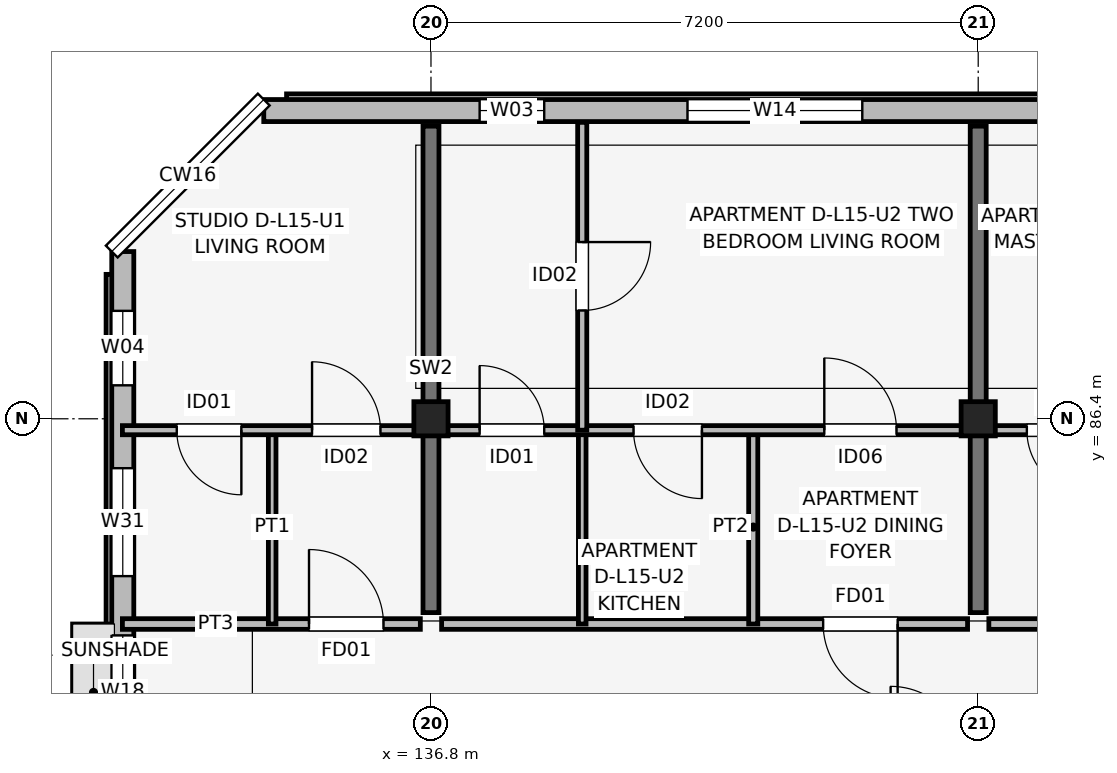
"""IFC4 building model, lengths in metres.
Left out: names, types, materials, properties, quantities, classifications, styles, units other than length and angle.
Written with IfcOpenShell. Run it as: python <this file> out.ifc"""

import sys

from ifc_helpers import new_model, si_unit, direction, frame, frame_2d, origin, origin_2d, place, context, subcontext, project, spatial, rectangle, extrude, element, fill, save


model = new_model("IFC4")
c1 = context("Model", 3, precision=1e-05, world=origin(), true_north=direction((0.0, 1.0)))
c2 = subcontext(c1, "Body", "Model", "MODEL_VIEW")
j1 = project(units=[si_unit("LENGTHUNIT", "METRE"), si_unit("PLANEANGLEUNIT", "RADIAN")], contexts=[c1])
p1 = place(None, origin())
s1 = spatial("IfcSite", under=j1, at=p1, CompositionType="ELEMENT")
p2 = place(p1, origin())
s2 = spatial("IfcBuilding", under=s1, at=p2, CompositionType="ELEMENT")
p3 = place(p2, frame((0.0, 0.0, 49.65)))
s3 = spatial("IfcBuildingStorey", under=s2, at=p3, CompositionType="ELEMENT", Elevation=49.65)
for number, where, z_axis, x_axis in (
    (1, (136.8, 86.4, 0.0), (0.0, 0.0, 1.0), (1.0, 0.0, 0.0)),
    (2, (144.0, 86.4, 0.0), (0.0, 0.0, 1.0), (1.0, 0.0, 0.0)),
):
    element("IfcColumn", number, at=place(p3, frame(where, z_axis=z_axis, x_axis=x_axis)), inside=s3, PredefinedType="COLUMN", context=c2, shape_type="SweptSolid", body=[
        extrude(rectangle(XDim=0.45, YDim=0.45, at=origin_2d()), origin(), (0.0, 0.0, 1.0), 3.15),
    ])
for number, where, z_axis, x_axis in (
    (3, (136.8, 83.85, 0.0), (0.0, 0.0, 1.0), (0.0, 1.0, 0.0)),
    (4, (144.0, 83.85, 0.0), (0.0, 0.0, 1.0), (0.0, 1.0, 0.0)),
):
    element("IfcWall", number, at=place(p3, frame(where, z_axis=z_axis, x_axis=x_axis)), inside=s3, PredefinedType="SHEAR", context=c2, shape_type="SweptSolid", body=[
        extrude(rectangle(XDim=6.4, YDim=0.21, at=frame_2d((3.2, 0.0))), origin(), (0.0, 0.0, 1.0), 3.15),
    ])
p4 = place(p3, frame((161.2, 90.455, 0.0), z_axis=(0.0, 0.0, 1.0), x_axis=(-1.0, 0.0, 0.0)))
e5 = element("IfcWall", 5, at=p4, inside=s3, PredefinedType="SOLIDWALL", context=c2, shape_type="SweptSolid", body=[
    extrude(rectangle(XDim=26.6, YDim=0.29, at=frame_2d((13.3, 0.0))), origin(), (0.0, 0.0, 1.0), 2.48),
])
p5 = place(p4, frame((22.91, 0.0, 0.75)))
e6 = element("IfcOpeningElement", 6, at=p5, cuts=e5, PredefinedType="OPENING", context=c2, shape_type="SweptSolid", body=[
    extrude(rectangle(XDim=0.85, YDim=1.4, at=frame_2d((0.425, 0.7))), frame((0.0, 0.155, 0.0), z_axis=(0.0, -1.0, 0.0), x_axis=(1.0, 0.0, 0.0)), (0.0, 0.0, 1.0), 0.31),
])
p6 = place(p4, frame((18.725, 0.0, 0.7)))
e7 = element("IfcOpeningElement", 7, at=p6, cuts=e5, PredefinedType="OPENING", context=c2, shape_type="SweptSolid", body=[
    extrude(rectangle(XDim=2.3, YDim=1.65, at=frame_2d((1.15, 0.825))), frame((0.0, 0.155, 0.0), z_axis=(0.0, -1.0, 0.0), x_axis=(1.0, 0.0, 0.0)), (0.0, 0.0, 1.0), 0.31),
])
p7 = place(p4, frame((13.935, 0.0, 0.7)))
e8 = element("IfcOpeningElement", 8, at=p7, cuts=e5, PredefinedType="OPENING", context=c2, shape_type="SweptSolid", body=[
    extrude(rectangle(XDim=2.45, YDim=1.65, at=frame_2d((1.225, 0.825))), frame((0.0, 0.155, 0.0), z_axis=(0.0, -1.0, 0.0), x_axis=(1.0, 0.0, 0.0)), (0.0, 0.0, 1.0), 0.31),
])
p8 = place(p4, frame((11.09, 0.0, 0.75)))
e9 = element("IfcOpeningElement", 9, at=p8, cuts=e5, PredefinedType="OPENING", context=c2, shape_type="SweptSolid", body=[
    extrude(rectangle(XDim=1.22, YDim=1.5, at=frame_2d((0.61, 0.75))), frame((0.0, 0.155, 0.0), z_axis=(0.0, -1.0, 0.0), x_axis=(1.0, 0.0, 0.0)), (0.0, 0.0, 1.0), 0.31),
])
p9 = place(p4, frame((8.265, 0.0, 0.75)))
e10 = element("IfcOpeningElement", 10, at=p9, cuts=e5, PredefinedType="OPENING", context=c2, shape_type="SweptSolid", body=[
    extrude(rectangle(XDim=1.34, YDim=1.55, at=frame_2d((0.67, 0.775))), frame((0.0, 0.155, 0.0), z_axis=(0.0, -1.0, 0.0), x_axis=(1.0, 0.0, 0.0)), (0.0, 0.0, 1.0), 0.31),
])
p10 = place(p4, frame((4.545, 0.0, 0.7)))
e11 = element("IfcOpeningElement", 11, at=p10, cuts=e5, PredefinedType="OPENING", context=c2, shape_type="SweptSolid", body=[
    extrude(rectangle(XDim=1.86, YDim=1.6, at=frame_2d((0.93, 0.8))), frame((0.0, 0.155, 0.0), z_axis=(0.0, -1.0, 0.0), x_axis=(1.0, 0.0, 0.0)), (0.0, 0.0, 1.0), 0.31),
])
p11 = place(p4, frame((0.41, 0.0, 0.7)))
e12 = element("IfcOpeningElement", 12, at=p11, cuts=e5, PredefinedType="OPENING", context=c2, shape_type="SweptSolid", body=[
    extrude(rectangle(XDim=2.0, YDim=1.65, at=frame_2d((1.0, 0.825))), frame((0.0, 0.155, 0.0), z_axis=(0.0, -1.0, 0.0), x_axis=(1.0, 0.0, 0.0)), (0.0, 0.0, 1.0), 0.31),
])
p12 = place(p3, frame((132.745, 88.6, 0.0), z_axis=(0.0, 0.0, 1.0), x_axis=(0.0, -1.0, 0.0)))
e13 = element("IfcWall", 13, at=p12, inside=s3, PredefinedType="SOLIDWALL", context=c2, shape_type="SweptSolid", body=[
    extrude(rectangle(XDim=14.6, YDim=0.29, at=frame_2d((7.3, 0.0))), origin(), (0.0, 0.0, 1.0), 2.91),
])
p13 = place(p12, frame((5.05, 0.0, 1.05)))
e14 = element("IfcOpeningElement", 14, at=p13, cuts=e13, PredefinedType="OPENING", context=c2, shape_type="SweptSolid", body=[
    extrude(rectangle(XDim=1.5, YDim=1.15, at=frame_2d((0.75, 0.575))), frame((0.0, 0.155, 0.0), z_axis=(0.0, -1.0, 0.0), x_axis=(1.0, 0.0, 0.0)), (0.0, 0.0, 1.0), 0.31),
])
p14 = place(p12, frame((2.85, 0.0, 0.75)))
e15 = element("IfcOpeningElement", 15, at=p14, cuts=e13, PredefinedType="OPENING", context=c2, shape_type="SweptSolid", body=[
    extrude(rectangle(XDim=1.42, YDim=1.6, at=frame_2d((0.71, 0.8))), frame((0.0, 0.155, 0.0), z_axis=(0.0, -1.0, 0.0), x_axis=(1.0, 0.0, 0.0)), (0.0, 0.0, 1.0), 0.31),
])
p15 = place(p12, frame((0.78, 0.0, 0.75)))
e16 = element("IfcOpeningElement", 16, at=p15, cuts=e13, PredefinedType="OPENING", context=c2, shape_type="SweptSolid", body=[
    extrude(rectangle(XDim=0.98, YDim=1.45, at=frame_2d((0.49, 0.725))), frame((0.0, 0.155, 0.0), z_axis=(0.0, -1.0, 0.0), x_axis=(1.0, 0.0, 0.0)), (0.0, 0.0, 1.0), 0.31),
])
p16 = place(p3, frame((132.74, 83.7, 0.0), z_axis=(0.0, 0.0, 1.0), x_axis=(1.0, 0.0, 0.0)))
e17 = element("IfcWall", 17, at=p16, inside=s3, PredefinedType="PARTITIONING", context=c2, shape_type="SweptSolid", body=[
    extrude(rectangle(XDim=3.92, YDim=0.14, at=frame_2d((1.96, 0.0))), origin(), (0.0, 0.0, 1.0), 2.38),
])
p17 = place(p16, frame((2.455, 0.0, 0.0)))
e18 = element("IfcOpeningElement", 18, at=p17, cuts=e17, PredefinedType="OPENING", context=c2, shape_type="SweptSolid", body=[
    extrude(rectangle(XDim=0.98, YDim=2.1, at=frame_2d((0.49, 1.05))), frame((0.0, 0.08, 0.0), z_axis=(0.0, -1.0, 0.0), x_axis=(1.0, 0.0, 0.0)), (0.0, 0.0, 1.0), 0.16),
])
p18 = place(p3, frame((134.711, 83.7, 0.0), z_axis=(0.0, 0.0, 1.0), x_axis=(0.0, 1.0, 0.0)))
e19 = element("IfcWall", 19, at=p18, inside=s3, PredefinedType="PARTITIONING", context=c2, shape_type="SweptSolid", body=[
    extrude(rectangle(XDim=2.55, YDim=0.1, at=frame_2d((1.275, 0.0))), origin(), (0.0, 0.0, 1.0), 2.38),
])
p19 = place(p3, frame((132.74, 86.25, 0.0), z_axis=(0.0, 0.0, 1.0), x_axis=(1.0, 0.0, 0.0)))
e20 = element("IfcWall", 20, at=p19, inside=s3, PredefinedType="PARTITIONING", context=c2, shape_type="SweptSolid", body=[
    extrude(rectangle(XDim=3.92, YDim=0.12, at=frame_2d((1.96, 0.0))), origin(), (0.0, 0.0, 1.0), 2.38),
])
p20 = place(p19, frame((1.565, 0.0, 0.0), z_axis=(0.0, 0.0, 1.0), x_axis=(-1.0, 0.0, 0.0)))
e21 = element("IfcOpeningElement", 21, at=p20, cuts=e20, PredefinedType="OPENING", context=c2, shape_type="SweptSolid", body=[
    extrude(rectangle(XDim=0.85, YDim=2.08, at=frame_2d((0.425, 1.04))), frame((0.0, 0.07, 0.0), z_axis=(0.0, -1.0, 0.0), x_axis=(1.0, 0.0, 0.0)), (0.0, 0.0, 1.0), 0.14),
])
p21 = place(p19, frame((2.495, 0.0, 0.0)))
e22 = element("IfcOpeningElement", 22, at=p21, cuts=e20, PredefinedType="OPENING", context=c2, shape_type="SweptSolid", body=[
    extrude(rectangle(XDim=0.9, YDim=2.08, at=frame_2d((0.45, 1.04))), frame((0.0, 0.07, 0.0), z_axis=(0.0, -1.0, 0.0), x_axis=(1.0, 0.0, 0.0)), (0.0, 0.0, 1.0), 0.14),
])
p22 = place(p3, frame((136.94, 83.7, 0.0), z_axis=(0.0, 0.0, 1.0), x_axis=(1.0, 0.0, 0.0)))
e23 = element("IfcWall", 23, at=p22, inside=s3, PredefinedType="PARTITIONING", context=c2, shape_type="SweptSolid", body=[
    extrude(rectangle(XDim=6.92, YDim=0.14, at=frame_2d((3.46, 0.0))), origin(), (0.0, 0.0, 1.0), 2.38),
])
p23 = place(p22, frame((6.0, 0.0, 0.0), z_axis=(0.0, 0.0, 1.0), x_axis=(-1.0, 0.0, 0.0)))
e24 = element("IfcOpeningElement", 24, at=p23, cuts=e23, PredefinedType="OPENING", context=c2, shape_type="SweptSolid", body=[
    extrude(rectangle(XDim=0.98, YDim=2.1, at=frame_2d((0.49, 1.05))), frame((0.0, 0.08, 0.0), z_axis=(0.0, -1.0, 0.0), x_axis=(1.0, 0.0, 0.0)), (0.0, 0.0, 1.0), 0.16),
])
p24 = place(p3, frame((138.79, 83.7, 0.0), z_axis=(0.0, 0.0, 1.0), x_axis=(0.0, 1.0, 0.0)))
e25 = element("IfcWall", 25, at=p24, inside=s3, PredefinedType="PARTITIONING", context=c2, shape_type="SweptSolid", body=[
    extrude(rectangle(XDim=2.55, YDim=0.1, at=frame_2d((1.275, 0.0))), origin(), (0.0, 0.0, 1.0), 2.38),
])
p25 = place(p3, frame((141.04, 83.7, 0.0), z_axis=(0.0, 0.0, 1.0), x_axis=(0.0, 1.0, 0.0)))
e26 = element("IfcWall", 26, at=p25, inside=s3, PredefinedType="PARTITIONING", context=c2, shape_type="SweptSolid", body=[
    extrude(rectangle(XDim=2.55, YDim=0.12, at=frame_2d((1.275, 0.0))), origin(), (0.0, 0.0, 1.0), 2.38),
])
p26 = place(p3, frame((136.94, 86.25, 0.0), z_axis=(0.0, 0.0, 1.0), x_axis=(1.0, 0.0, 0.0)))
e27 = element("IfcWall", 27, at=p26, inside=s3, PredefinedType="PARTITIONING", context=c2, shape_type="SweptSolid", body=[
    extrude(rectangle(XDim=6.92, YDim=0.12, at=frame_2d((3.46, 0.0))), origin(), (0.0, 0.0, 1.0), 2.38),
])
p27 = place(p26, frame((0.5, 0.0, 0.0)))
e28 = element("IfcOpeningElement", 28, at=p27, cuts=e27, PredefinedType="OPENING", context=c2, shape_type="SweptSolid", body=[
    extrude(rectangle(XDim=0.85, YDim=2.08, at=frame_2d((0.425, 1.04))), frame((0.0, 0.07, 0.0), z_axis=(0.0, -1.0, 0.0), x_axis=(1.0, 0.0, 0.0)), (0.0, 0.0, 1.0), 0.14),
])
p28 = place(p26, frame((3.425, 0.0, 0.0), z_axis=(0.0, 0.0, 1.0), x_axis=(-1.0, 0.0, 0.0)))
e29 = element("IfcOpeningElement", 29, at=p28, cuts=e27, PredefinedType="OPENING", context=c2, shape_type="SweptSolid", body=[
    extrude(rectangle(XDim=0.9, YDim=2.08, at=frame_2d((0.45, 1.04))), frame((0.0, 0.07, 0.0), z_axis=(0.0, -1.0, 0.0), x_axis=(1.0, 0.0, 0.0)), (0.0, 0.0, 1.0), 0.14),
])
p29 = place(p26, frame((5.035, 0.0, 0.0)))
e30 = element("IfcOpeningElement", 30, at=p29, cuts=e27, PredefinedType="OPENING", context=c2, shape_type="SweptSolid", body=[
    extrude(rectangle(XDim=0.95, YDim=2.08, at=frame_2d((0.475, 1.04))), frame((0.0, 0.07, 0.0), z_axis=(0.0, -1.0, 0.0), x_axis=(1.0, 0.0, 0.0)), (0.0, 0.0, 1.0), 0.14),
])
p30 = place(p3, frame((138.79, 86.25, 0.0), z_axis=(0.0, 0.0, 1.0), x_axis=(0.0, 1.0, 0.0)))
e31 = element("IfcWall", 31, at=p30, inside=s3, PredefinedType="PARTITIONING", context=c2, shape_type="SweptSolid", body=[
    extrude(rectangle(XDim=4.05, YDim=0.12, at=frame_2d((2.025, 0.0))), origin(), (0.0, 0.0, 1.0), 2.38),
])
p31 = place(p30, frame((2.475, 0.0, 0.0), z_axis=(0.0, 0.0, 1.0), x_axis=(-1.0, 0.0, 0.0)))
e32 = element("IfcOpeningElement", 32, at=p31, cuts=e31, PredefinedType="OPENING", context=c2, shape_type="SweptSolid", body=[
    extrude(rectangle(XDim=0.9, YDim=2.08, at=frame_2d((0.45, 1.04))), frame((0.0, 0.07, 0.0), z_axis=(0.0, -1.0, 0.0), x_axis=(1.0, 0.0, 0.0)), (0.0, 0.0, 1.0), 0.14),
])
p32 = place(p3, frame((144.14, 83.7, 0.0), z_axis=(0.0, 0.0, 1.0), x_axis=(1.0, 0.0, 0.0)))
e33 = element("IfcWall", 33, at=p32, inside=s3, PredefinedType="PARTITIONING", context=c2, shape_type="SweptSolid", body=[
    extrude(rectangle(XDim=6.92, YDim=0.14, at=frame_2d((3.46, 0.0))), origin(), (0.0, 0.0, 1.0), 2.38),
])
p33 = place(p32, frame((4.87, 0.0, 0.0)))
e34 = element("IfcOpeningElement", 34, at=p33, cuts=e33, PredefinedType="OPENING", context=c2, shape_type="SweptSolid", body=[
    extrude(rectangle(XDim=0.98, YDim=2.1, at=frame_2d((0.49, 1.05))), frame((0.0, 0.08, 0.0), z_axis=(0.0, -1.0, 0.0), x_axis=(1.0, 0.0, 0.0)), (0.0, 0.0, 1.0), 0.16),
])
p34 = place(p3, frame((144.14, 86.25, 0.0), z_axis=(0.0, 0.0, 1.0), x_axis=(1.0, 0.0, 0.0)))
e35 = element("IfcWall", 35, at=p34, inside=s3, PredefinedType="PARTITIONING", context=c2, shape_type="SweptSolid", body=[
    extrude(rectangle(XDim=6.92, YDim=0.12, at=frame_2d((3.46, 0.0))), origin(), (0.0, 0.0, 1.0), 2.38),
])
p35 = place(p34, frame((1.35, 0.0, 0.0), z_axis=(0.0, 0.0, 1.0), x_axis=(-1.0, 0.0, 0.0)))
e36 = element("IfcOpeningElement", 36, at=p35, cuts=e35, PredefinedType="OPENING", context=c2, shape_type="SweptSolid", body=[
    extrude(rectangle(XDim=0.85, YDim=2.08, at=frame_2d((0.425, 1.04))), frame((0.0, 0.07, 0.0), z_axis=(0.0, -1.0, 0.0), x_axis=(1.0, 0.0, 0.0)), (0.0, 0.0, 1.0), 0.14),
])
p36 = place(p34, frame((2.375, 0.0, 0.0)))
e37 = element("IfcOpeningElement", 37, at=p36, cuts=e35, PredefinedType="OPENING", context=c2, shape_type="SweptSolid", body=[
    extrude(rectangle(XDim=0.9, YDim=2.08, at=frame_2d((0.45, 1.04))), frame((0.0, 0.07, 0.0), z_axis=(0.0, -1.0, 0.0), x_axis=(1.0, 0.0, 0.0)), (0.0, 0.0, 1.0), 0.14),
])
p37 = place(p34, frame((5.835, 0.0, 0.0), z_axis=(0.0, 0.0, 1.0), x_axis=(-1.0, 0.0, 0.0)))
e38 = element("IfcOpeningElement", 38, at=p37, cuts=e35, PredefinedType="OPENING", context=c2, shape_type="SweptSolid", body=[
    extrude(rectangle(XDim=0.95, YDim=2.08, at=frame_2d((0.475, 1.04))), frame((0.0, 0.07, 0.0), z_axis=(0.0, -1.0, 0.0), x_axis=(1.0, 0.0, 0.0)), (0.0, 0.0, 1.0), 0.14),
])
p38 = place(p5, origin())
e39 = element("IfcWindow", 39, at=p38, inside=s3, PartitioningType="SINGLE_PANEL", PredefinedType="WINDOW", context=c2, shape_type="SweptSolid", body=[
    extrude(rectangle(XDim=0.85, YDim=1.4, at=frame_2d((0.425, 0.7))), frame((0.0, 0.03, 0.0), z_axis=(0.0, -1.0, 0.0), x_axis=(1.0, 0.0, 0.0)), (0.0, 0.0, 1.0), 0.06),
])
fill(e6, e39)
p39 = place(p6, origin())
e40 = element("IfcWindow", 40, at=p39, inside=s3, PartitioningType="SINGLE_PANEL", PredefinedType="WINDOW", context=c2, shape_type="SweptSolid", body=[
    extrude(rectangle(XDim=2.3, YDim=1.65, at=frame_2d((1.15, 0.825))), frame((0.0, 0.03, 0.0), z_axis=(0.0, -1.0, 0.0), x_axis=(1.0, 0.0, 0.0)), (0.0, 0.0, 1.0), 0.06),
])
fill(e7, e40)
p40 = place(p13, origin())
e41 = element("IfcWindow", 41, at=p40, inside=s3, PartitioningType="SINGLE_PANEL", PredefinedType="WINDOW", context=c2, shape_type="SweptSolid", body=[
    extrude(rectangle(XDim=1.5, YDim=1.15, at=frame_2d((0.75, 0.575))), frame((0.0, 0.03, 0.0), z_axis=(0.0, -1.0, 0.0), x_axis=(1.0, 0.0, 0.0)), (0.0, 0.0, 1.0), 0.06),
])
fill(e14, e41)
p41 = place(p14, origin())
e42 = element("IfcWindow", 42, at=p41, inside=s3, PartitioningType="SINGLE_PANEL", PredefinedType="WINDOW", context=c2, shape_type="SweptSolid", body=[
    extrude(rectangle(XDim=1.42, YDim=1.6, at=frame_2d((0.71, 0.8))), frame((0.0, 0.03, 0.0), z_axis=(0.0, -1.0, 0.0), x_axis=(1.0, 0.0, 0.0)), (0.0, 0.0, 1.0), 0.06),
])
fill(e15, e42)
p42 = place(p15, origin())
e43 = element("IfcWindow", 43, at=p42, inside=s3, PartitioningType="SINGLE_PANEL", PredefinedType="WINDOW", context=c2, shape_type="SweptSolid", body=[
    extrude(rectangle(XDim=0.98, YDim=1.45, at=frame_2d((0.49, 0.725))), frame((0.0, 0.03, 0.0), z_axis=(0.0, -1.0, 0.0), x_axis=(1.0, 0.0, 0.0)), (0.0, 0.0, 1.0), 0.06),
])
fill(e16, e43)
p43 = place(p17, origin())
e44 = element("IfcDoor", 44, at=p43, inside=s3, OperationType="SINGLE_SWING_LEFT", PredefinedType="DOOR", context=c2, shape_type="SweptSolid", body=[
    extrude(rectangle(XDim=0.98, YDim=2.1, at=frame_2d((0.49, 1.05))), frame((0.0, 0.025, 0.0), z_axis=(0.0, -1.0, 0.0), x_axis=(1.0, 0.0, 0.0)), (0.0, 0.0, 1.0), 0.05),
])
fill(e18, e44)
p44 = place(p20, origin())
e45 = element("IfcDoor", 45, at=p44, inside=s3, OperationType="SINGLE_SWING_RIGHT", PredefinedType="DOOR", context=c2, shape_type="SweptSolid", body=[
    extrude(rectangle(XDim=0.85, YDim=2.08, at=frame_2d((0.425, 1.04))), frame((0.0, 0.025, 0.0), z_axis=(0.0, -1.0, 0.0), x_axis=(1.0, 0.0, 0.0)), (0.0, 0.0, 1.0), 0.05),
])
fill(e21, e45)
p45 = place(p21, origin())
e46 = element("IfcDoor", 46, at=p45, inside=s3, OperationType="SINGLE_SWING_LEFT", PredefinedType="DOOR", context=c2, shape_type="SweptSolid", body=[
    extrude(rectangle(XDim=0.9, YDim=2.08, at=frame_2d((0.45, 1.04))), frame((0.0, 0.025, 0.0), z_axis=(0.0, -1.0, 0.0), x_axis=(1.0, 0.0, 0.0)), (0.0, 0.0, 1.0), 0.05),
])
fill(e22, e46)
p46 = place(p23, origin())
e47 = element("IfcDoor", 47, at=p46, inside=s3, OperationType="SINGLE_SWING_RIGHT", PredefinedType="DOOR", context=c2, shape_type="SweptSolid", body=[
    extrude(rectangle(XDim=0.98, YDim=2.1, at=frame_2d((0.49, 1.05))), frame((0.0, 0.025, 0.0), z_axis=(0.0, -1.0, 0.0), x_axis=(1.0, 0.0, 0.0)), (0.0, 0.0, 1.0), 0.05),
])
fill(e24, e47)
p47 = place(p27, origin())
e48 = element("IfcDoor", 48, at=p47, inside=s3, OperationType="SINGLE_SWING_LEFT", PredefinedType="DOOR", context=c2, shape_type="SweptSolid", body=[
    extrude(rectangle(XDim=0.85, YDim=2.08, at=frame_2d((0.425, 1.04))), frame((0.0, 0.025, 0.0), z_axis=(0.0, -1.0, 0.0), x_axis=(1.0, 0.0, 0.0)), (0.0, 0.0, 1.0), 0.05),
])
fill(e28, e48)
p48 = place(p28, origin())
e49 = element("IfcDoor", 49, at=p48, inside=s3, OperationType="SINGLE_SWING_RIGHT", PredefinedType="DOOR", context=c2, shape_type="SweptSolid", body=[
    extrude(rectangle(XDim=0.9, YDim=2.08, at=frame_2d((0.45, 1.04))), frame((0.0, 0.025, 0.0), z_axis=(0.0, -1.0, 0.0), x_axis=(1.0, 0.0, 0.0)), (0.0, 0.0, 1.0), 0.05),
])
fill(e29, e49)
p49 = place(p29, origin())
e50 = element("IfcDoor", 50, at=p49, inside=s3, OperationType="SINGLE_SWING_LEFT", PredefinedType="DOOR", context=c2, shape_type="SweptSolid", body=[
    extrude(rectangle(XDim=0.95, YDim=2.08, at=frame_2d((0.475, 1.04))), frame((0.0, 0.025, 0.0), z_axis=(0.0, -1.0, 0.0), x_axis=(1.0, 0.0, 0.0)), (0.0, 0.0, 1.0), 0.05),
])
fill(e30, e50)
p50 = place(p31, origin())
e51 = element("IfcDoor", 51, at=p50, inside=s3, OperationType="SINGLE_SWING_RIGHT", PredefinedType="DOOR", context=c2, shape_type="SweptSolid", body=[
    extrude(rectangle(XDim=0.9, YDim=2.08, at=frame_2d((0.45, 1.04))), frame((0.0, 0.025, 0.0), z_axis=(0.0, -1.0, 0.0), x_axis=(1.0, 0.0, 0.0)), (0.0, 0.0, 1.0), 0.05),
])
fill(e32, e51)
p51 = place(p35, origin())
e52 = element("IfcDoor", 52, at=p51, inside=s3, OperationType="SINGLE_SWING_RIGHT", PredefinedType="DOOR", context=c2, shape_type="SweptSolid", body=[
    extrude(rectangle(XDim=0.85, YDim=2.08, at=frame_2d((0.425, 1.04))), frame((0.0, 0.025, 0.0), z_axis=(0.0, -1.0, 0.0), x_axis=(1.0, 0.0, 0.0)), (0.0, 0.0, 1.0), 0.05),
])
fill(e36, e52)
save(model, sys.argv[1])
